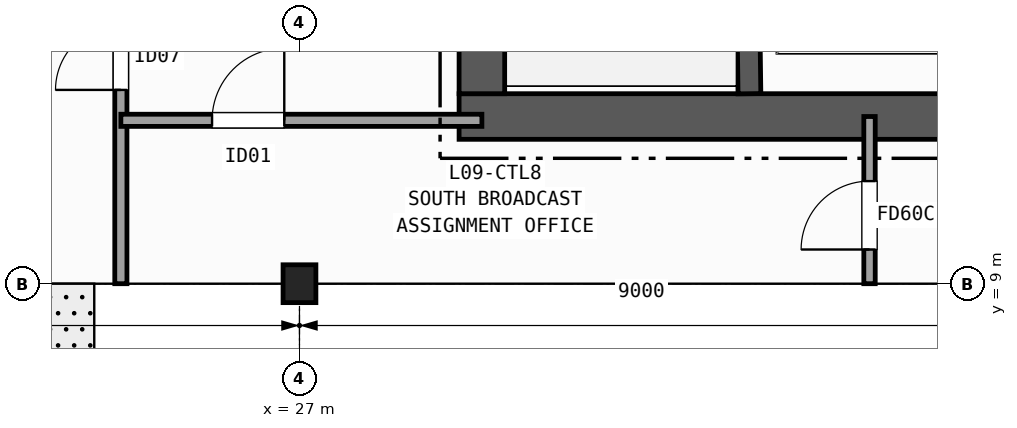
"""IFC4 building model, lengths in metres.
Left out: names, types, materials, properties, quantities, classifications, styles, units other than length and angle.
Written with IfcOpenShell. Run it as: python <this file> out.ifc"""

import sys

from ifc_helpers import new_model, si_unit, direction, frame, frame_2d, origin, origin_2d, place, context, subcontext, project, spatial, rectangle, i_section, extrude, element, fill, save


model = new_model("IFC4")
c1 = context("Model", 3, precision=1e-05, world=origin(), true_north=direction((0.0, 1.0)))
c2 = subcontext(c1, "Body", "Model", "MODEL_VIEW")
j1 = project(units=[si_unit("LENGTHUNIT", "METRE"), si_unit("PLANEANGLEUNIT", "RADIAN")], contexts=[c1])
p1 = place(None, origin())
s1 = spatial("IfcSite", under=j1, at=p1, CompositionType="ELEMENT")
p2 = place(p1, origin())
s2 = spatial("IfcBuilding", under=s1, at=p2, CompositionType="ELEMENT")
p3 = place(p2, frame((0.0, 0.0, 43.4)))
s3 = spatial("IfcBuildingStorey", under=s2, at=p3, CompositionType="ELEMENT", Elevation=43.4)
p4 = place(p3, frame((27.0, 9.0, 0.0), z_axis=(0.0, 0.0, 1.0), x_axis=(1.0, 0.0, 0.0)))
e1 = element("IfcColumn", 1, at=p4, inside=s3, PredefinedType="COLUMN", context=c2, shape_type="SweptSolid", body=[
    extrude(i_section(OverallWidth=0.432, OverallDepth=0.498, WebThickness=0.056, FlangeThickness=0.089, FilletRadius=0.015, at=origin_2d()), origin(), (0.0, 0.0, 1.0), 3.7),
])
p5 = place(p3, frame((29.1, 11.2, 0.0), z_axis=(0.0, 0.0, 1.0), x_axis=(1.0, 0.0, 0.0)))
e2 = element("IfcWall", 2, at=p5, inside=s3, PredefinedType="SHEAR", context=c2, shape_type="SweptSolid", body=[
    extrude(rectangle(XDim=14.0, YDim=0.6, at=frame_2d((7.0, 0.0))), origin(), (0.0, 0.0, 1.0), 3.42),
])
p6 = place(p3, frame((29.4, 24.3, 0.0), z_axis=(0.0, 0.0, 1.0), x_axis=(0.0, -1.0, 0.0)))
e3 = element("IfcWall", 3, at=p6, inside=s3, PredefinedType="SHEAR", context=c2, shape_type="SweptSolid", body=[
    extrude(rectangle(XDim=12.8, YDim=0.6, at=frame_2d((6.4, 0.0))), origin(), (0.0, 0.0, 1.0), 3.42),
])
p7 = place(p6, frame((1.4, 0.0, 0.0)))
e4 = element("IfcOpeningElement", 4, at=p7, cuts=e3, PredefinedType="OPENING", context=c2, shape_type="SweptSolid", body=[
    extrude(rectangle(XDim=1.35, YDim=2.15, at=frame_2d((0.675, 1.075))), frame((0.0, 0.31, 0.0), z_axis=(0.0, -1.0, 0.0), x_axis=(1.0, 0.0, 0.0)), (0.0, 0.0, 1.0), 0.62),
])
p8 = place(p3, frame((32.92, 11.5, 0.0), z_axis=(0.0, 0.0, 1.0), x_axis=(-0.013244407292, 0.999912288991, 0.0)))
e5 = element("IfcWall", 5, at=p8, inside=s3, PredefinedType="SHEAR", context=c2, shape_type="SweptSolid", body=[
    extrude(rectangle(XDim=9.051, YDim=0.3, at=frame_2d((4.525, 0.0))), origin(), (0.0, 0.0, 1.0), 3.42),
])
p9 = place(p3, frame((24.65, 9.0, 0.0), z_axis=(0.0, 0.0, 1.0), x_axis=(0.0, 1.0, 0.0)))
e6 = element("IfcWall", 6, at=p9, inside=s3, PredefinedType="PARTITIONING", context=c2, shape_type="SweptSolid", body=[
    extrude(rectangle(XDim=19.2, YDim=0.16, at=frame_2d((9.6, 0.0))), origin(), (0.0, 0.0, 1.0), 2.627),
])
p10 = place(p9, frame((2.55, 0.0, 0.0)))
e7 = element("IfcOpeningElement", 7, at=p10, cuts=e6, PredefinedType="OPENING", context=c2, shape_type="SweptSolid", body=[
    extrude(rectangle(XDim=0.86, YDim=2.05, at=frame_2d((0.43, 1.025))), frame((0.0, 0.09, 0.0), z_axis=(0.0, -1.0, 0.0), x_axis=(1.0, 0.0, 0.0)), (0.0, 0.0, 1.0), 0.18),
])
p11 = place(p9, frame((8.55, 0.0, 0.0)))
e8 = element("IfcOpeningElement", 8, at=p11, cuts=e6, PredefinedType="OPENING", context=c2, shape_type="SweptSolid", body=[
    extrude(rectangle(XDim=0.95, YDim=2.1, at=frame_2d((0.475, 1.05))), frame((0.0, 0.09, 0.0), z_axis=(0.0, -1.0, 0.0), x_axis=(1.0, 0.0, 0.0)), (0.0, 0.0, 1.0), 0.18),
])
p12 = place(p9, frame((13.44, 0.0, 0.0)))
e9 = element("IfcOpeningElement", 9, at=p12, cuts=e6, PredefinedType="OPENING", context=c2, shape_type="SweptSolid", body=[
    extrude(rectangle(XDim=1.0, YDim=2.1, at=frame_2d((0.5, 1.05))), frame((0.0, 0.09, 0.0), z_axis=(0.0, -1.0, 0.0), x_axis=(1.0, 0.0, 0.0)), (0.0, 0.0, 1.0), 0.18),
])
p13 = place(p3, frame((24.65, 11.15, 0.0), z_axis=(0.0, 0.0, 1.0), x_axis=(1.0, 0.0, 0.0)))
e10 = element("IfcWall", 10, at=p13, inside=s3, PredefinedType="PARTITIONING", context=c2, shape_type="SweptSolid", body=[
    extrude(rectangle(XDim=4.75, YDim=0.16, at=frame_2d((2.375, 0.0))), origin(), (0.0, 0.0, 1.0), 2.792),
])
p14 = place(p13, frame((1.2, 0.0, 0.0)))
e11 = element("IfcOpeningElement", 11, at=p14, cuts=e10, PredefinedType="OPENING", context=c2, shape_type="SweptSolid", body=[
    extrude(rectangle(XDim=0.95, YDim=2.1, at=frame_2d((0.475, 1.05))), frame((0.0, 0.09, 0.0), z_axis=(0.0, -1.0, 0.0), x_axis=(1.0, 0.0, 0.0)), (0.0, 0.0, 1.0), 0.18),
])
p15 = place(p3, frame((34.5, 9.0, 0.0), z_axis=(0.0, 0.0, 1.0), x_axis=(0.0, 1.0, 0.0)))
e12 = element("IfcWall", 12, at=p15, inside=s3, PredefinedType="PARTITIONING", context=c2, shape_type="SweptSolid", body=[
    extrude(rectangle(XDim=2.2, YDim=0.15, at=frame_2d((1.1, 0.0))), origin(), (0.0, 0.0, 1.0), 2.627),
])
p16 = place(p15, frame((0.45, 0.0, 0.0)))
e13 = element("IfcOpeningElement", 13, at=p16, cuts=e12, PredefinedType="OPENING", context=c2, shape_type="SweptSolid", body=[
    extrude(rectangle(XDim=0.9, YDim=2.1, at=frame_2d((0.45, 1.05))), frame((0.0, 0.085, 0.0), z_axis=(0.0, -1.0, 0.0), x_axis=(1.0, 0.0, 0.0)), (0.0, 0.0, 1.0), 0.17),
])
p17 = place(p10, origin())
e14 = element("IfcDoor", 14, at=p17, inside=s3, OperationType="SINGLE_SWING_LEFT", PredefinedType="DOOR", context=c2, shape_type="SweptSolid", body=[
    extrude(rectangle(XDim=0.86, YDim=2.05, at=frame_2d((0.43, 1.025))), frame((0.0, 0.025, 0.0), z_axis=(0.0, -1.0, 0.0), x_axis=(1.0, 0.0, 0.0)), (0.0, 0.0, 1.0), 0.05),
])
fill(e7, e14)
p18 = place(p14, origin())
e15 = element("IfcDoor", 15, at=p18, inside=s3, OperationType="SINGLE_SWING_RIGHT", PredefinedType="DOOR", context=c2, shape_type="SweptSolid", body=[
    extrude(rectangle(XDim=0.95, YDim=2.1, at=frame_2d((0.475, 1.05))), frame((0.0, 0.025, 0.0), z_axis=(0.0, -1.0, 0.0), x_axis=(1.0, 0.0, 0.0)), (0.0, 0.0, 1.0), 0.05),
])
fill(e11, e15)
p19 = place(p16, origin())
e16 = element("IfcDoor", 16, at=p19, inside=s3, OperationType="SINGLE_SWING_LEFT", PredefinedType="DOOR", context=c2, shape_type="SweptSolid", body=[
    extrude(rectangle(XDim=0.9, YDim=2.1, at=frame_2d((0.45, 1.05))), frame((0.0, 0.025, 0.0), z_axis=(0.0, -1.0, 0.0), x_axis=(1.0, 0.0, 0.0)), (0.0, 0.0, 1.0), 0.05),
])
fill(e13, e16)
save(model, sys.argv[1])
